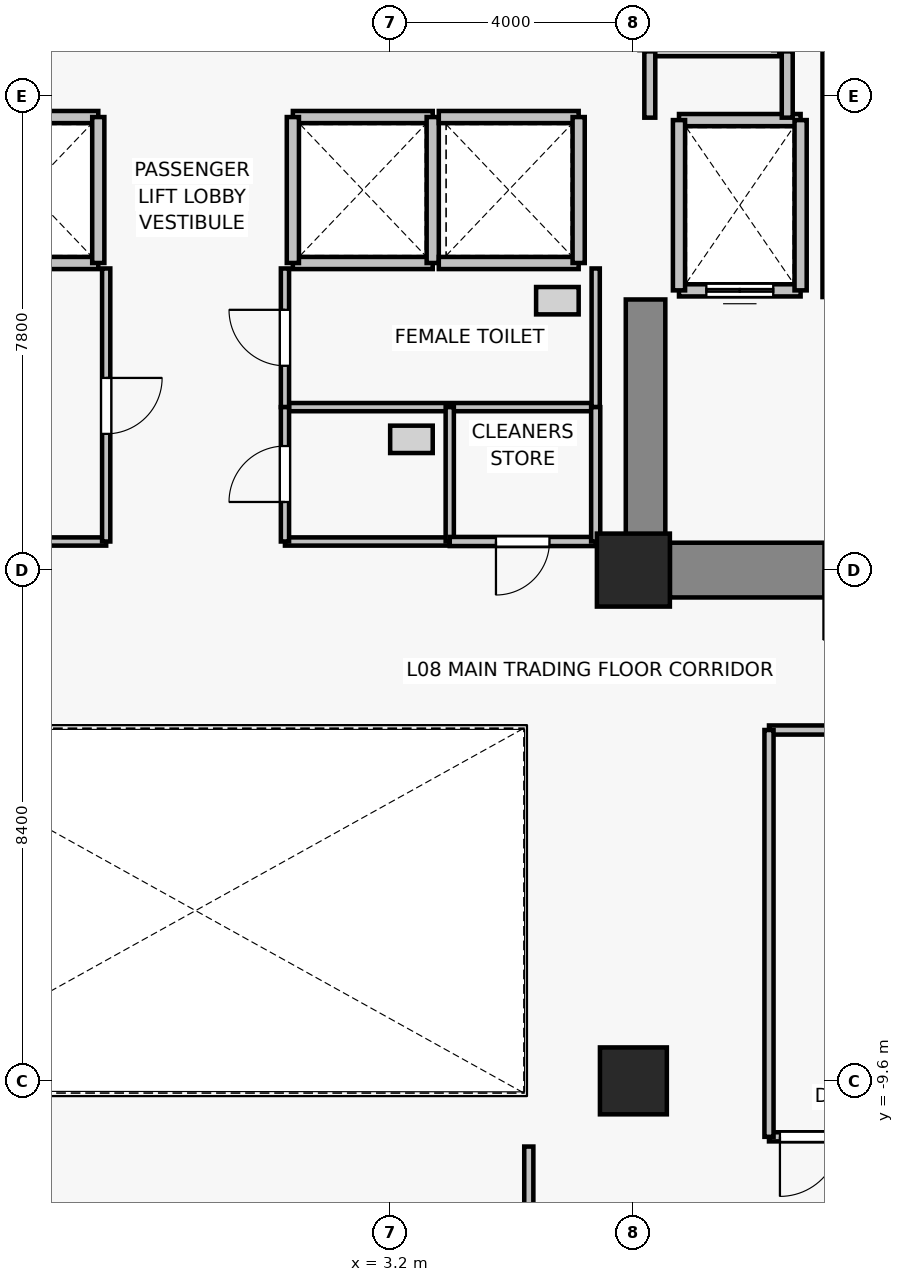
"""IFC4 building model, lengths in metres.
Left out: names, types, materials, properties, quantities, classifications, styles, units other than length and angle.
Written with IfcOpenShell. Run it as: python <this file> out.ifc"""

import sys

from ifc_helpers import new_model, si_unit, direction, frame, frame_2d, origin, origin_2d, place, context, subcontext, project, spatial, rectangle, extrude, source, transform, mapped, element, fill, save


model = new_model("IFC4")
c1 = context("Model", 3, precision=1e-05, world=origin(), true_north=direction((0.0, 1.0)))
c2 = subcontext(c1, "Body", "Model", "MODEL_VIEW")
j1 = project(units=[si_unit("LENGTHUNIT", "METRE"), si_unit("PLANEANGLEUNIT", "RADIAN")], contexts=[c1])
p1 = place(None, origin())
s1 = spatial("IfcSite", under=j1, at=p1, CompositionType="ELEMENT")
p2 = place(p1, origin())
s2 = spatial("IfcBuilding", under=s1, at=p2, CompositionType="ELEMENT")
p3 = place(p2, frame((0.0, 0.0, 34.0)))
s3 = spatial("IfcBuildingStorey", under=s2, at=p3, CompositionType="ELEMENT", Elevation=34.0)
p4 = place(p3, frame((7.2, -1.2, 0.0), z_axis=(0.0, 0.0, 1.0), x_axis=(1.0, 0.0, 0.0)))
e1 = element("IfcColumn", 1, at=p4, inside=s3, PredefinedType="COLUMN", context=c2, shape_type="SweptSolid", body=[
    extrude(rectangle(XDim=1.2, YDim=1.2, at=origin_2d()), origin(), (0.0, 0.0, 1.0), 3.3),
])
p5 = place(p3, frame((7.2, -9.6, 0.0), z_axis=(0.0, 0.0, 1.0), x_axis=(1.0, 0.0, 0.0)))
e2 = element("IfcColumn", 2, at=p5, inside=s3, PredefinedType="COLUMN", context=c2, shape_type="SweptSolid", body=[
    extrude(rectangle(XDim=1.1, YDim=1.1, at=origin_2d()), origin(), (0.0, 0.0, 1.0), 3.3),
])
p6 = place(p3, frame((13.8, -1.2, 0.0), z_axis=(0.0, 0.0, 1.0), x_axis=(-1.0, 0.0, 0.0)))
e3 = element("IfcWall", 3, at=p6, inside=s3, PredefinedType="SHEAR", context=c2, shape_type="SweptSolid", body=[
    extrude(rectangle(XDim=6.0, YDim=0.9, at=frame_2d((3.0, 0.0))), origin(), (0.0, 0.0, 1.0), 3.075),
])
p7 = place(p6, frame((2.325, 0.0, 0.0)))
e4 = element("IfcOpeningElement", 4, at=p7, cuts=e3, PredefinedType="OPENING", context=c2, shape_type="SweptSolid", body=[
    extrude(rectangle(XDim=1.15, YDim=2.15, at=frame_2d((0.575, 1.075))), frame((0.0, 0.46, 0.0), z_axis=(0.0, -1.0, 0.0), x_axis=(1.0, 0.0, 0.0)), (0.0, 0.0, 1.0), 0.92),
])
p8 = place(p3, frame((7.4, -0.75, 0.0), z_axis=(0.0, 0.0, 1.0), x_axis=(0.0, 1.0, 0.0)))
e5 = element("IfcWall", 5, at=p8, inside=s3, PredefinedType="SHEAR", context=c2, shape_type="SweptSolid", body=[
    extrude(rectangle(XDim=4.0, YDim=0.65, at=frame_2d((2.0, 0.0))), origin(), (0.0, 0.0, 1.0), 3.075),
])
p9 = place(p3, frame((9.95, 3.4, 0.0), z_axis=(0.0, 0.0, 1.0), x_axis=(-1.0, 0.0, 0.0)))
e6 = element("IfcWall", 6, at=p9, inside=s3, PredefinedType="SOLIDWALL", context=c2, shape_type="SweptSolid", body=[
    extrude(rectangle(XDim=2.0, YDim=0.2, at=frame_2d((1.0, 0.0))), origin(), (0.0, 0.0, 1.0), 3.075),
])
p10 = place(p9, frame((0.45, 0.0, 0.0)))
e7 = element("IfcOpeningElement", 7, at=p10, cuts=e6, PredefinedType="OPENING", context=c2, shape_type="SweptSolid", body=[
    extrude(rectangle(XDim=1.1, YDim=2.2, at=frame_2d((0.55, 1.1))), frame((0.0, 0.11, 0.0), z_axis=(0.0, -1.0, 0.0), x_axis=(1.0, 0.0, 0.0)), (0.0, 0.0, 1.0), 0.22),
])
p11 = place(p3, frame((7.95, 6.2, 0.0), z_axis=(0.0, 0.0, 1.0), x_axis=(1.0, 0.0, 0.0)))
e8 = element("IfcWall", 8, at=p11, inside=s3, PredefinedType="SOLIDWALL", context=c2, shape_type="SweptSolid", body=[
    extrude(rectangle(XDim=2.0, YDim=0.2, at=frame_2d((1.0, 0.0))), origin(), (0.0, 0.0, 1.0), 3.075),
])
for number, where, z_axis, x_axis in (
    (9, (7.95, 3.4, 0.0), (0.0, 0.0, 1.0), (0.0, 1.0, 0.0)),
    (10, (9.95, 6.2, 0.0), (0.0, 0.0, 1.0), (0.0, -1.0, 0.0)),
):
    element("IfcWall", number, at=place(p3, frame(where, z_axis=z_axis, x_axis=x_axis)), inside=s3, PredefinedType="SOLIDWALL", context=c2, shape_type="SweptSolid", body=[
        extrude(rectangle(XDim=2.8, YDim=0.2, at=frame_2d((1.4, 0.0))), origin(), (0.0, 0.0, 1.0), 3.075),
    ])
for number, where, z_axis, x_axis in (
    (11, (-1.6, 3.85, 0.0), (0.0, 0.0, 1.0), (-1.0, 0.0, 0.0)),
    (12, (-3.9, 6.25, 0.0), (0.0, 0.0, 1.0), (1.0, 0.0, 0.0)),
):
    element("IfcWall", number, at=place(p3, frame(where, z_axis=z_axis, x_axis=x_axis)), inside=s3, PredefinedType="SOLIDWALL", context=c2, shape_type="SweptSolid", body=[
        extrude(rectangle(XDim=2.3, YDim=0.2, at=frame_2d((1.15, 0.0))), origin(), (0.0, 0.0, 1.0), 3.075),
    ])
p12 = place(p3, frame((-1.6, 6.25, 0.0), z_axis=(0.0, 0.0, 1.0), x_axis=(0.0, -1.0, 0.0)))
e13 = element("IfcWall", 13, at=p12, inside=s3, PredefinedType="SOLIDWALL", context=c2, shape_type="SweptSolid", body=[
    extrude(rectangle(XDim=2.4, YDim=0.2, at=frame_2d((1.2, 0.0))), origin(), (0.0, 0.0, 1.0), 3.075),
])
for number, where, z_axis, x_axis in (
    (14, (3.9, 3.85, 0.0), (0.0, 0.0, 1.0), (-1.0, 0.0, 0.0)),
    (15, (1.6, 6.25, 0.0), (0.0, 0.0, 1.0), (1.0, 0.0, 0.0)),
):
    element("IfcWall", number, at=place(p3, frame(where, z_axis=z_axis, x_axis=x_axis)), inside=s3, PredefinedType="SOLIDWALL", context=c2, shape_type="SweptSolid", body=[
        extrude(rectangle(XDim=2.3, YDim=0.2, at=frame_2d((1.15, 0.0))), origin(), (0.0, 0.0, 1.0), 3.075),
    ])
for number, where, z_axis, x_axis in (
    (16, (1.6, 3.85, 0.0), (0.0, 0.0, 1.0), (0.0, 1.0, 0.0)),
    (17, (3.9, 6.25, 0.0), (0.0, 0.0, 1.0), (0.0, -1.0, 0.0)),
):
    element("IfcWall", number, at=place(p3, frame(where, z_axis=z_axis, x_axis=x_axis)), inside=s3, PredefinedType="SOLIDWALL", context=c2, shape_type="SweptSolid", body=[
        extrude(rectangle(XDim=2.4, YDim=0.2, at=frame_2d((1.2, 0.0))), origin(), (0.0, 0.0, 1.0), 3.075),
    ])
for number, where, z_axis, x_axis in (
    (18, (6.3, 3.85, 0.0), (0.0, 0.0, 1.0), (-1.0, 0.0, 0.0)),
    (19, (4.0, 6.25, 0.0), (0.0, 0.0, 1.0), (1.0, 0.0, 0.0)),
):
    element("IfcWall", number, at=place(p3, frame(where, z_axis=z_axis, x_axis=x_axis)), inside=s3, PredefinedType="SOLIDWALL", context=c2, shape_type="SweptSolid", body=[
        extrude(rectangle(XDim=2.3, YDim=0.2, at=frame_2d((1.15, 0.0))), origin(), (0.0, 0.0, 1.0), 3.075),
    ])
p13 = place(p3, frame((6.3, 6.25, 0.0), z_axis=(0.0, 0.0, 1.0), x_axis=(0.0, -1.0, 0.0)))
e20 = element("IfcWall", 20, at=p13, inside=s3, PredefinedType="SOLIDWALL", context=c2, shape_type="SweptSolid", body=[
    extrude(rectangle(XDim=2.4, YDim=0.2, at=frame_2d((1.2, 0.0))), origin(), (0.0, 0.0, 1.0), 3.075),
])
p14 = place(p3, frame((9.6, 7.35, 0.0), z_axis=(0.0, 0.0, 1.0), x_axis=(-1.0, 0.0, 0.0)))
e21 = element("IfcWall", 21, at=p14, inside=s3, PredefinedType="SOLIDWALL", context=c2, shape_type="SweptSolid", body=[
    extrude(rectangle(XDim=2.2, YDim=0.2, at=frame_2d((1.1, 0.0))), origin(), (0.0, 0.0, 1.0), 2.465),
])
p15 = place(p3, frame((10.41, 3.29, 0.0), z_axis=(0.0, 0.0, 1.0), x_axis=(0.0, 1.0, 0.0)))
e22 = element("IfcWall", 22, at=p15, inside=s3, PredefinedType="SOLIDWALL", context=c2, shape_type="SweptSolid", body=[
    extrude(rectangle(XDim=8.84, YDim=0.2, at=frame_2d((4.42, 0.0))), origin(), (0.0, 0.0, 1.0), 3.075),
])
p16 = place(p3, frame((7.47, 6.24, 0.0), z_axis=(0.0, 0.0, 1.0), x_axis=(0.0, 1.0, 0.0)))
e23 = element("IfcWall", 23, at=p16, inside=s3, PredefinedType="PARTITIONING", context=c2, shape_type="SweptSolid", body=[
    extrude(rectangle(XDim=1.09, YDim=0.18, at=frame_2d((0.545, 0.0))), origin(), (0.0, 0.0, 1.0), 2.465),
])
p17 = place(p3, frame((9.73, 7.33, 0.0), z_axis=(0.0, 0.0, 1.0), x_axis=(0.0, -1.0, 0.0)))
e24 = element("IfcWall", 24, at=p17, inside=s3, PredefinedType="PARTITIONING", context=c2, shape_type="SweptSolid", body=[
    extrude(rectangle(XDim=1.09, YDim=0.18, at=frame_2d((0.545, 0.0))), origin(), (0.0, 0.0, 1.0), 3.075),
])
p18 = place(p3, frame((-1.47, -0.73, 0.0), z_axis=(0.0, 0.0, 1.0), x_axis=(-1.0, 0.0, 0.0)))
e25 = element("IfcWall", 25, at=p18, inside=s3, PredefinedType="PARTITIONING", context=c2, shape_type="SweptSolid", body=[
    extrude(rectangle(XDim=5.11, YDim=0.135, at=frame_2d((2.555, 0.0))), origin(), (0.0, 0.0, 1.0), 3.075),
])
p19 = place(p3, frame((-1.47, 3.76, 0.0), z_axis=(0.0, 0.0, 1.0), x_axis=(0.0, -1.0, 0.0)))
e26 = element("IfcWall", 26, at=p19, inside=s3, PredefinedType="PARTITIONING", context=c2, shape_type="SweptSolid", body=[
    extrude(rectangle(XDim=4.49, YDim=0.135, at=frame_2d((2.245, 0.0))), origin(), (0.0, 0.0, 1.0), 3.075),
])
p20 = place(p19, frame((1.8, 0.0, 0.0)))
e27 = element("IfcOpeningElement", 27, at=p20, cuts=e26, PredefinedType="OPENING", context=c2, shape_type="SweptSolid", body=[
    extrude(rectangle(XDim=0.92, YDim=2.1, at=frame_2d((0.46, 1.05))), frame((0.0, 0.077, 0.0), z_axis=(0.0, -1.0, 0.0), x_axis=(1.0, 0.0, 0.0)), (0.0, 0.0, 1.0), 0.155),
])
p21 = place(p3, frame((6.58, 1.48, 0.0), z_axis=(0.0, 0.0, 1.0), x_axis=(-1.0, 0.0, 0.0)))
e28 = element("IfcWall", 28, at=p21, inside=s3, PredefinedType="PARTITIONING", context=c2, shape_type="SweptSolid", body=[
    extrude(rectangle(XDim=5.11, YDim=0.135, at=frame_2d((2.555, 0.0))), origin(), (0.0, 0.0, 1.0), 3.075),
])
p22 = place(p3, frame((1.47, 1.48, 0.0), z_axis=(0.0, 0.0, 1.0), x_axis=(0.0, 1.0, 0.0)))
e29 = element("IfcWall", 29, at=p22, inside=s3, PredefinedType="PARTITIONING", context=c2, shape_type="SweptSolid", body=[
    extrude(rectangle(XDim=2.28, YDim=0.135, at=frame_2d((1.14, 0.0))), origin(), (0.0, 0.0, 1.0), 3.075),
])
p23 = place(p22, frame((0.68, 0.0, 0.0)))
e30 = element("IfcOpeningElement", 30, at=p23, cuts=e29, PredefinedType="OPENING", context=c2, shape_type="SweptSolid", body=[
    extrude(rectangle(XDim=0.92, YDim=2.1, at=frame_2d((0.46, 1.05))), frame((0.0, 0.077, 0.0), z_axis=(0.0, -1.0, 0.0), x_axis=(1.0, 0.0, 0.0)), (0.0, 0.0, 1.0), 0.155),
])
p24 = place(p3, frame((6.58, 3.76, 0.0), z_axis=(0.0, 0.0, 1.0), x_axis=(0.0, -1.0, 0.0)))
e31 = element("IfcWall", 31, at=p24, inside=s3, PredefinedType="PARTITIONING", context=c2, shape_type="SweptSolid", body=[
    extrude(rectangle(XDim=2.28, YDim=0.135, at=frame_2d((1.14, 0.0))), origin(), (0.0, 0.0, 1.0), 3.075),
])
p25 = place(p3, frame((4.18, -0.73, 0.0), z_axis=(0.0, 0.0, 1.0), x_axis=(-1.0, 0.0, 0.0)))
e32 = element("IfcWall", 32, at=p25, inside=s3, PredefinedType="PARTITIONING", context=c2, shape_type="SweptSolid", body=[
    extrude(rectangle(XDim=2.71, YDim=0.135, at=frame_2d((1.355, 0.0))), origin(), (0.0, 0.0, 1.0), 3.075),
])
p26 = place(p3, frame((1.47, -0.73, 0.0), z_axis=(0.0, 0.0, 1.0), x_axis=(0.0, 1.0, 0.0)))
e33 = element("IfcWall", 33, at=p26, inside=s3, PredefinedType="PARTITIONING", context=c2, shape_type="SweptSolid", body=[
    extrude(rectangle(XDim=2.21, YDim=0.135, at=frame_2d((1.105, 0.0))), origin(), (0.0, 0.0, 1.0), 3.075),
])
p27 = place(p26, frame((0.65, 0.0, 0.0)))
e34 = element("IfcOpeningElement", 34, at=p27, cuts=e33, PredefinedType="OPENING", context=c2, shape_type="SweptSolid", body=[
    extrude(rectangle(XDim=0.92, YDim=2.1, at=frame_2d((0.46, 1.05))), frame((0.0, 0.077, 0.0), z_axis=(0.0, -1.0, 0.0), x_axis=(1.0, 0.0, 0.0)), (0.0, 0.0, 1.0), 0.155),
])
p28 = place(p3, frame((4.18, 1.48, 0.0), z_axis=(0.0, 0.0, 1.0), x_axis=(0.0, -1.0, 0.0)))
e35 = element("IfcWall", 35, at=p28, inside=s3, PredefinedType="PARTITIONING", context=c2, shape_type="SweptSolid", body=[
    extrude(rectangle(XDim=2.21, YDim=0.135, at=frame_2d((1.105, 0.0))), origin(), (0.0, 0.0, 1.0), 3.075),
])
p29 = place(p3, frame((6.58, -0.73, 0.0), z_axis=(0.0, 0.0, 1.0), x_axis=(-1.0, 0.0, 0.0)))
e36 = element("IfcWall", 36, at=p29, inside=s3, PredefinedType="PARTITIONING", context=c2, shape_type="SweptSolid", body=[
    extrude(rectangle(XDim=2.4, YDim=0.15, at=frame_2d((1.2, 0.0))), origin(), (0.0, 0.0, 1.0), 3.075),
])
p30 = place(p29, frame((0.76, 0.0, 0.0)))
e37 = element("IfcOpeningElement", 37, at=p30, cuts=e36, PredefinedType="OPENING", context=c2, shape_type="SweptSolid", body=[
    extrude(rectangle(XDim=0.88, YDim=2.1, at=frame_2d((0.44, 1.05))), frame((0.0, 0.085, 0.0), z_axis=(0.0, -1.0, 0.0), x_axis=(1.0, 0.0, 0.0)), (0.0, 0.0, 1.0), 0.17),
])
p31 = place(p3, frame((6.58, 1.48, 0.0), z_axis=(0.0, 0.0, 1.0), x_axis=(0.0, -1.0, 0.0)))
e38 = element("IfcWall", 38, at=p31, inside=s3, PredefinedType="PARTITIONING", context=c2, shape_type="SweptSolid", body=[
    extrude(rectangle(XDim=2.21, YDim=0.15, at=frame_2d((1.105, 0.0))), origin(), (0.0, 0.0, 1.0), 3.075),
])
p32 = place(p3, frame((17.415, -10.52, 0.0), z_axis=(0.0, 0.0, 1.0), x_axis=(-1.0, 0.0, 0.0)))
e39 = element("IfcWall", 39, at=p32, inside=s3, PredefinedType="PARTITIONING", context=c2, shape_type="SweptSolid", body=[
    extrude(rectangle(XDim=7.985, YDim=0.15, at=frame_2d((3.993, 0.0))), origin(), (0.0, 0.0, 1.0), 2.465),
])
p33 = place(p32, frame((6.825, 0.0, 0.0)))
e40 = element("IfcOpeningElement", 40, at=p33, cuts=e39, PredefinedType="OPENING", context=c2, shape_type="SweptSolid", body=[
    extrude(rectangle(XDim=0.98, YDim=2.15, at=frame_2d((0.49, 1.075))), frame((0.0, 0.085, 0.0), z_axis=(0.0, -1.0, 0.0), x_axis=(1.0, 0.0, 0.0)), (0.0, 0.0, 1.0), 0.17),
])
p34 = place(p3, frame((9.43, -3.83, 0.0), z_axis=(0.0, 0.0, 1.0), x_axis=(1.0, 0.0, 0.0)))
e41 = element("IfcWall", 41, at=p34, inside=s3, PredefinedType="PARTITIONING", context=c2, shape_type="SweptSolid", body=[
    extrude(rectangle(XDim=7.985, YDim=0.15, at=frame_2d((3.993, 0.0))), origin(), (0.0, 0.0, 1.0), 2.465),
])
p35 = place(p34, frame((3.502, 0.0, 0.0)))
e42 = element("IfcOpeningElement", 42, at=p35, cuts=e41, PredefinedType="OPENING", context=c2, shape_type="SweptSolid", body=[
    extrude(rectangle(XDim=0.98, YDim=2.15, at=frame_2d((0.49, 1.075))), frame((0.0, 0.085, 0.0), z_axis=(0.0, -1.0, 0.0), x_axis=(1.0, 0.0, 0.0)), (0.0, 0.0, 1.0), 0.17),
])
p36 = place(p3, frame((9.43, -10.52, 0.0), z_axis=(0.0, 0.0, 1.0), x_axis=(0.0, 1.0, 0.0)))
e43 = element("IfcWall", 43, at=p36, inside=s3, PredefinedType="PARTITIONING", context=c2, shape_type="SweptSolid", body=[
    extrude(rectangle(XDim=6.69, YDim=0.15, at=frame_2d((3.345, 0.0))), origin(), (0.0, 0.0, 1.0), 2.465),
])
p37 = place(p3, frame((5.48, -18.13, 0.0), z_axis=(0.0, 0.0, 1.0), x_axis=(0.0, 1.0, 0.0)))
e44 = element("IfcWall", 44, at=p37, inside=s3, PredefinedType="PARTITIONING", context=c2, shape_type="SweptSolid", body=[
    extrude(rectangle(XDim=7.45, YDim=0.15, at=frame_2d((3.725, 0.0))), origin(), (0.0, 0.0, 1.0), 2.465),
])
m1 = source(origin(), c2, "Body", "SweptSolid", [
    extrude(rectangle(XDim=1.1, YDim=2.2, at=frame_2d((0.55, 1.1))), frame((0.0, 0.025, 0.0), z_axis=(0.0, -1.0, 0.0), x_axis=(1.0, 0.0, 0.0)), (0.0, 0.0, 1.0), 0.05),
])
p38 = place(p10, origin())
e45 = element("IfcDoor", 45, at=p38, inside=s3, OperationType="DOUBLE_DOOR_SLIDING", PredefinedType="DOOR", context=c2, shape_type="MappedRepresentation", body=[
    mapped(m1, transform((0.0, 0.0, 0.0), x_axis=(1.0, 0.0, 0.0), y_axis=(0.0, 1.0, 0.0), z_axis=(0.0, 0.0, 1.0), scale=1.0)),
])
fill(e7, e45)
m2 = source(origin(), c2, "Body", "SweptSolid", [
    extrude(rectangle(XDim=1.15, YDim=2.15, at=frame_2d((0.575, 1.075))), frame((0.0, 0.025, 0.0), z_axis=(0.0, -1.0, 0.0), x_axis=(1.0, 0.0, 0.0)), (0.0, 0.0, 1.0), 0.05),
])
p39 = place(p7, origin())
e46 = element("IfcDoor", 46, at=p39, inside=s3, OperationType="SINGLE_SWING_RIGHT", PredefinedType="DOOR", context=c2, shape_type="MappedRepresentation", body=[
    mapped(m2, transform((0.0, 0.0, 0.0), x_axis=(1.0, 0.0, 0.0), y_axis=(0.0, 1.0, 0.0), z_axis=(0.0, 0.0, 1.0), scale=1.0)),
])
fill(e4, e46)
m3 = source(origin(), c2, "Body", "SweptSolid", [
    extrude(rectangle(XDim=0.92, YDim=2.1, at=frame_2d((0.46, 1.05))), frame((0.0, 0.025, 0.0), z_axis=(0.0, -1.0, 0.0), x_axis=(1.0, 0.0, 0.0)), (0.0, 0.0, 1.0), 0.05),
])
p40 = place(p20, origin())
e47 = element("IfcDoor", 47, at=p40, inside=s3, OperationType="SINGLE_SWING_LEFT", PredefinedType="DOOR", context=c2, shape_type="MappedRepresentation", body=[
    mapped(m3, transform((0.0, 0.0, 0.0), x_axis=(1.0, 0.0, 0.0), y_axis=(0.0, 1.0, 0.0), z_axis=(0.0, 0.0, 1.0), scale=1.0)),
])
fill(e27, e47)
p41 = place(p23, origin())
e48 = element("IfcDoor", 48, at=p41, inside=s3, OperationType="SINGLE_SWING_RIGHT", PredefinedType="DOOR", context=c2, shape_type="MappedRepresentation", body=[
    mapped(m3, transform((0.0, 0.0, 0.0), x_axis=(1.0, 0.0, 0.0), y_axis=(0.0, 1.0, 0.0), z_axis=(0.0, 0.0, 1.0), scale=1.0)),
])
fill(e30, e48)
p42 = place(p27, origin())
e49 = element("IfcDoor", 49, at=p42, inside=s3, OperationType="SINGLE_SWING_LEFT", PredefinedType="DOOR", context=c2, shape_type="MappedRepresentation", body=[
    mapped(m3, transform((0.0, 0.0, 0.0), x_axis=(1.0, 0.0, 0.0), y_axis=(0.0, 1.0, 0.0), z_axis=(0.0, 0.0, 1.0), scale=1.0)),
])
fill(e34, e49)
m4 = source(origin(), c2, "Body", "SweptSolid", [
    extrude(rectangle(XDim=0.88, YDim=2.1, at=frame_2d((0.44, 1.05))), frame((0.0, 0.025, 0.0), z_axis=(0.0, -1.0, 0.0), x_axis=(1.0, 0.0, 0.0)), (0.0, 0.0, 1.0), 0.05),
])
p43 = place(p30, origin())
e50 = element("IfcDoor", 50, at=p43, inside=s3, OperationType="SINGLE_SWING_RIGHT", PredefinedType="DOOR", context=c2, shape_type="MappedRepresentation", body=[
    mapped(m4, transform((0.0, 0.0, 0.0), x_axis=(1.0, 0.0, 0.0), y_axis=(0.0, 1.0, 0.0), z_axis=(0.0, 0.0, 1.0), scale=1.0)),
])
fill(e37, e50)
m5 = source(origin(), c2, "Body", "SweptSolid", [
    extrude(rectangle(XDim=0.98, YDim=2.15, at=frame_2d((0.49, 1.075))), frame((0.0, 0.025, 0.0), z_axis=(0.0, -1.0, 0.0), x_axis=(1.0, 0.0, 0.0)), (0.0, 0.0, 1.0), 0.05),
])
p44 = place(p33, origin())
e51 = element("IfcDoor", 51, at=p44, inside=s3, OperationType="SINGLE_SWING_RIGHT", PredefinedType="DOOR", context=c2, shape_type="MappedRepresentation", body=[
    mapped(m5, transform((0.0, 0.0, 0.0), x_axis=(1.0, 0.0, 0.0), y_axis=(0.0, 1.0, 0.0), z_axis=(0.0, 0.0, 1.0), scale=1.0)),
])
fill(e40, e51)
save(model, sys.argv[1])
